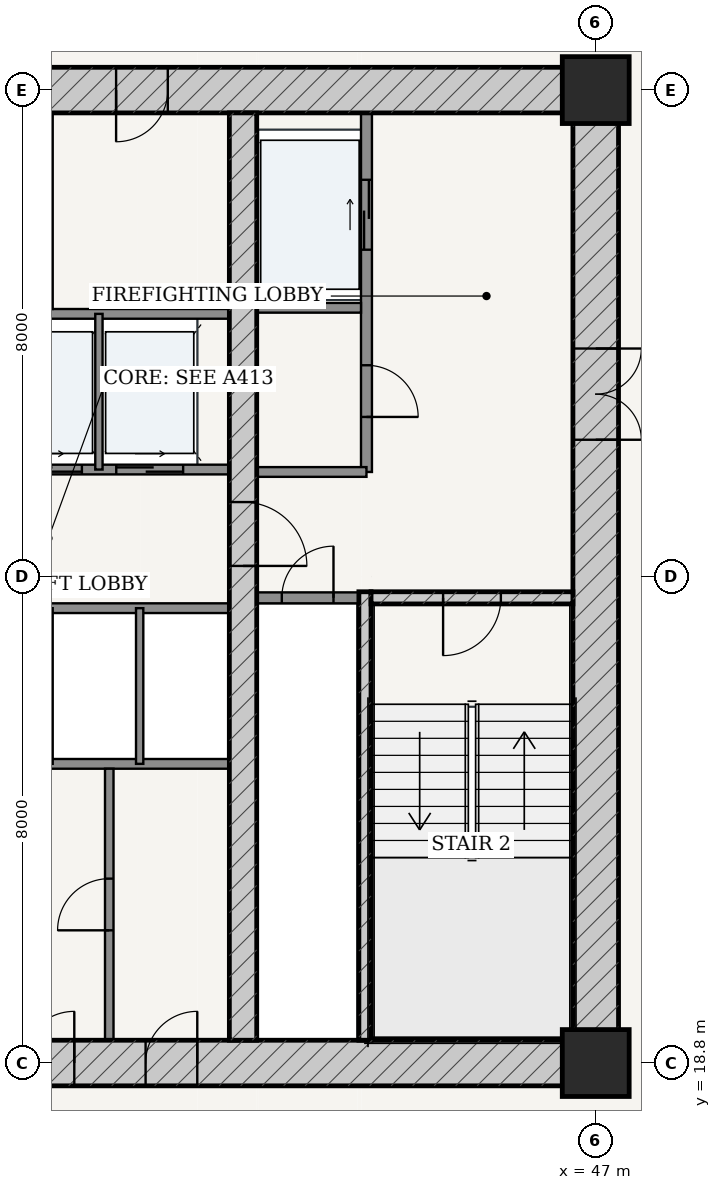
"""IFC4 building model, lengths in metres.
Left out: names, types, materials, properties, quantities, classifications, styles, units other than length and angle.
Written with IfcOpenShell. Run it as: python <this file> out.ifc"""

import sys

from ifc_helpers import new_model, si_unit, direction, frame, frame_2d, origin, origin_2d, place, context, subcontext, project, spatial, rectangle, extrude, source, transform, mapped, element, fill, save


model = new_model("IFC4")
c1 = context("Model", 3, precision=1e-05, world=origin(), true_north=direction((-0.2419218956, 0.970295726276)))
c2 = subcontext(c1, "Body", "Model", "MODEL_VIEW")
j1 = project(units=[si_unit("LENGTHUNIT", "METRE"), si_unit("PLANEANGLEUNIT", "RADIAN")], contexts=[c1])
p1 = place(None, origin())
s1 = spatial("IfcSite", under=j1, at=p1, CompositionType="ELEMENT")
p2 = place(p1, origin())
s2 = spatial("IfcBuilding", under=s1, at=p2, CompositionType="ELEMENT")
p3 = place(p2, frame((0.0, 0.0, 67.2)))
s3 = spatial("IfcBuildingStorey", under=s2, at=p3, CompositionType="ELEMENT", Elevation=67.2)
for number, where, z_axis, x_axis in (
    (1, (47.0, 18.8, 0.0), (0.0, 0.0, 1.0), (1.0, 0.0, 0.0)),
    (2, (47.0, 34.8, 0.0), (0.0, 0.0, 1.0), (1.0, 0.0, 0.0)),
):
    element("IfcColumn", number, at=place(p3, frame(where, z_axis=z_axis, x_axis=x_axis)), inside=s3, PredefinedType="COLUMN", context=c2, shape_type="SweptSolid", body=[
        extrude(rectangle(XDim=1.1, YDim=1.1, at=origin_2d()), origin(), (0.0, 0.0, 1.0), 3.6),
    ])
p4 = place(p3, frame((28.625, 18.8, 0.0), z_axis=(0.0, 0.0, 1.0), x_axis=(1.0, 0.0, 0.0)))
e3 = element("IfcWall", 3, at=p4, inside=s3, PredefinedType="SHEAR", context=c2, shape_type="SweptSolid", body=[
    extrude(rectangle(XDim=18.75, YDim=0.75, at=frame_2d((9.375, 0.0))), origin(), (0.0, 0.0, 1.0), 3.32),
])
p5 = place(p4, frame((6.927, 0.0, 0.0)))
e4 = element("IfcOpeningElement", 4, at=p5, cuts=e3, PredefinedType="OPENING", context=c2, shape_type="SweptSolid", body=[
    extrude(rectangle(XDim=0.85, YDim=2.1, at=frame_2d((0.425, 1.05))), frame((0.0, 0.385, 0.0), z_axis=(0.0, -1.0, 0.0), x_axis=(1.0, 0.0, 0.0)), (0.0, 0.0, 1.0), 0.77),
])
p6 = place(p4, frame((8.95, 0.0, 0.0)))
e5 = element("IfcOpeningElement", 5, at=p6, cuts=e3, PredefinedType="OPENING", context=c2, shape_type="SweptSolid", body=[
    extrude(rectangle(XDim=0.85, YDim=2.1, at=frame_2d((0.425, 1.05))), frame((0.0, 0.385, 0.0), z_axis=(0.0, -1.0, 0.0), x_axis=(1.0, 0.0, 0.0)), (0.0, 0.0, 1.0), 0.77),
])
p7 = place(p4, frame((10.972, 0.0, 0.0)))
e6 = element("IfcOpeningElement", 6, at=p7, cuts=e3, PredefinedType="OPENING", context=c2, shape_type="SweptSolid", body=[
    extrude(rectangle(XDim=0.85, YDim=2.1, at=frame_2d((0.425, 1.05))), frame((0.0, 0.385, 0.0), z_axis=(0.0, -1.0, 0.0), x_axis=(1.0, 0.0, 0.0)), (0.0, 0.0, 1.0), 0.77),
])
p8 = place(p3, frame((28.625, 34.8, 0.0), z_axis=(0.0, 0.0, 1.0), x_axis=(1.0, 0.0, 0.0)))
e7 = element("IfcWall", 7, at=p8, inside=s3, PredefinedType="SHEAR", context=c2, shape_type="SweptSolid", body=[
    extrude(rectangle(XDim=18.75, YDim=0.75, at=frame_2d((9.375, 0.0))), origin(), (0.0, 0.0, 1.0), 3.32),
])
p9 = place(p8, frame((7.407, 0.0, 0.0)))
e8 = element("IfcOpeningElement", 8, at=p9, cuts=e7, PredefinedType="OPENING", context=c2, shape_type="SweptSolid", body=[
    extrude(rectangle(XDim=0.86, YDim=2.1, at=frame_2d((0.43, 1.05))), frame((0.0, 0.385, 0.0), z_axis=(0.0, -1.0, 0.0), x_axis=(1.0, 0.0, 0.0)), (0.0, 0.0, 1.0), 0.77),
])
p10 = place(p8, frame((10.488, 0.0, 0.0)))
e9 = element("IfcOpeningElement", 9, at=p10, cuts=e7, PredefinedType="OPENING", context=c2, shape_type="SweptSolid", body=[
    extrude(rectangle(XDim=0.85, YDim=2.1, at=frame_2d((0.425, 1.05))), frame((0.0, 0.385, 0.0), z_axis=(0.0, -1.0, 0.0), x_axis=(1.0, 0.0, 0.0)), (0.0, 0.0, 1.0), 0.77),
])
p11 = place(p3, frame((47.0, 19.175, 0.0), z_axis=(0.0, 0.0, 1.0), x_axis=(0.0, 1.0, 0.0)))
e10 = element("IfcWall", 10, at=p11, inside=s3, PredefinedType="SHEAR", context=c2, shape_type="SweptSolid", body=[
    extrude(rectangle(XDim=15.25, YDim=0.75, at=frame_2d((7.625, 0.0))), origin(), (0.0, 0.0, 1.0), 3.32),
])
p12 = place(p11, frame((9.875, 0.0, 0.0)))
e11 = element("IfcOpeningElement", 11, at=p12, cuts=e10, PredefinedType="OPENING", context=c2, shape_type="SweptSolid", body=[
    extrude(rectangle(XDim=1.5, YDim=2.2, at=frame_2d((0.75, 1.1))), frame((0.0, 0.385, 0.0), z_axis=(0.0, -1.0, 0.0), x_axis=(1.0, 0.0, 0.0)), (0.0, 0.0, 1.0), 0.77),
])
p13 = place(p3, frame((43.205, 19.175, 0.0), z_axis=(0.0, 0.0, 1.0), x_axis=(0.0, 1.0, 0.0)))
e12 = element("IfcWall", 12, at=p13, inside=s3, PredefinedType="SOLIDWALL", context=c2, shape_type="SweptSolid", body=[
    extrude(rectangle(XDim=7.375, YDim=0.2, at=frame_2d((3.688, 0.0))), origin(), (0.0, 0.0, 1.0), 3.32),
])
p14 = place(p3, frame((43.305, 26.45, 0.0), z_axis=(0.0, 0.0, 1.0), x_axis=(1.0, 0.0, 0.0)))
e13 = element("IfcWall", 13, at=p14, inside=s3, PredefinedType="SOLIDWALL", context=c2, shape_type="SweptSolid", body=[
    extrude(rectangle(XDim=3.32, YDim=0.2, at=frame_2d((1.66, 0.0))), origin(), (0.0, 0.0, 1.0), 3.32),
])
p15 = place(p14, frame((1.185, 0.0, 0.0)))
e14 = element("IfcOpeningElement", 14, at=p15, cuts=e13, PredefinedType="OPENING", context=c2, shape_type="SweptSolid", body=[
    extrude(rectangle(XDim=0.95, YDim=2.15, at=frame_2d((0.475, 1.075))), frame((0.0, 0.11, 0.0), z_axis=(0.0, -1.0, 0.0), x_axis=(1.0, 0.0, 0.0)), (0.0, 0.0, 1.0), 0.22),
])
p16 = place(p3, frame((41.2, 19.175, 0.0), z_axis=(0.0, 0.0, 1.0), x_axis=(0.0, 1.0, 0.0)))
e15 = element("IfcWall", 15, at=p16, inside=s3, PredefinedType="SHEAR", context=c2, shape_type="SweptSolid", body=[
    extrude(rectangle(XDim=15.25, YDim=0.45, at=frame_2d((7.625, 0.0))), origin(), (0.0, 0.0, 1.0), 3.32),
])
p17 = place(p16, frame((7.8, 0.0, 0.0)))
e16 = element("IfcOpeningElement", 16, at=p17, cuts=e15, PredefinedType="OPENING", context=c2, shape_type="SweptSolid", body=[
    extrude(rectangle(XDim=1.05, YDim=2.15, at=frame_2d((0.525, 1.075))), frame((0.0, 0.235, 0.0), z_axis=(0.0, -1.0, 0.0), x_axis=(1.0, 0.0, 0.0)), (0.0, 0.0, 1.0), 0.47),
])
p18 = place(p3, frame((41.425, 26.45, 0.0), z_axis=(0.0, 0.0, 1.0), x_axis=(1.0, 0.0, 0.0)))
e17 = element("IfcWall", 17, at=p18, inside=s3, PredefinedType="PARTITIONING", context=c2, shape_type="SweptSolid", body=[
    extrude(rectangle(XDim=1.675, YDim=0.18, at=frame_2d((0.837, 0.0))), origin(), (0.0, 0.0, 1.0), 3.32),
])
p19 = place(p18, frame((0.413, 0.0, 0.0)))
e18 = element("IfcOpeningElement", 18, at=p19, cuts=e17, PredefinedType="OPENING", context=c2, shape_type="SweptSolid", body=[
    extrude(rectangle(XDim=0.85, YDim=2.1, at=frame_2d((0.425, 1.05))), frame((0.0, 0.1, 0.0), z_axis=(0.0, -1.0, 0.0), x_axis=(1.0, 0.0, 0.0)), (0.0, 0.0, 1.0), 0.2),
])
p20 = place(p3, frame((43.23, 28.52, 0.0), z_axis=(0.0, 0.0, 1.0), x_axis=(0.0, 1.0, 0.0)))
e19 = element("IfcWall", 19, at=p20, inside=s3, PredefinedType="PARTITIONING", context=c2, shape_type="SweptSolid", body=[
    extrude(rectangle(XDim=5.905, YDim=0.18, at=frame_2d((2.953, 0.0))), origin(), (0.0, 0.0, 1.0), 3.32),
])
p21 = place(p20, frame((0.905, 0.0, 0.0)))
e20 = element("IfcOpeningElement", 20, at=p21, cuts=e19, PredefinedType="OPENING", context=c2, shape_type="SweptSolid", body=[
    extrude(rectangle(XDim=0.85, YDim=2.1, at=frame_2d((0.425, 1.05))), frame((0.0, 0.1, 0.0), z_axis=(0.0, -1.0, 0.0), x_axis=(1.0, 0.0, 0.0)), (0.0, 0.0, 1.0), 0.2),
])
p22 = place(p20, frame((3.655, 0.0, 0.0)))
e21 = element("IfcOpeningElement", 21, at=p22, cuts=e19, PredefinedType="OPENING", context=c2, shape_type="SweptSolid", body=[
    extrude(rectangle(XDim=1.15, YDim=2.2, at=frame_2d((0.575, 1.1))), frame((0.0, 0.1, 0.0), z_axis=(0.0, -1.0, 0.0), x_axis=(1.0, 0.0, 0.0)), (0.0, 0.0, 1.0), 0.2),
])
p23 = place(p3, frame((41.425, 31.22, 0.0), z_axis=(0.0, 0.0, 1.0), x_axis=(1.0, 0.0, 0.0)))
e22 = element("IfcWall", 22, at=p23, inside=s3, PredefinedType="PARTITIONING", context=c2, shape_type="SweptSolid", body=[
    extrude(rectangle(XDim=1.715, YDim=0.16, at=frame_2d((0.857, 0.0))), origin(), (0.0, 0.0, 1.0), 3.32),
])
p24 = place(p3, frame((41.425, 28.52, 0.0), z_axis=(0.0, 0.0, 1.0), x_axis=(1.0, 0.0, 0.0)))
e23 = element("IfcWall", 23, at=p24, inside=s3, PredefinedType="PARTITIONING", context=c2, shape_type="SweptSolid", body=[
    extrude(rectangle(XDim=1.805, YDim=0.16, at=frame_2d((0.902, 0.0))), origin(), (0.0, 0.0, 1.0), 3.32),
])
p25 = place(p3, frame((35.025, 28.56, 0.0), z_axis=(0.0, 0.0, 1.0), x_axis=(1.0, 0.0, 0.0)))
e24 = element("IfcWall", 24, at=p25, inside=s3, PredefinedType="PARTITIONING", context=c2, shape_type="SweptSolid", body=[
    extrude(rectangle(XDim=5.95, YDim=0.16, at=frame_2d((2.975, 0.0))), origin(), (0.0, 0.0, 1.0), 3.32),
])
p26 = place(p25, frame((0.76, 0.0, 0.0)))
e25 = element("IfcOpeningElement", 25, at=p26, cuts=e24, PredefinedType="OPENING", context=c2, shape_type="SweptSolid", body=[
    extrude(rectangle(XDim=1.1, YDim=2.2, at=frame_2d((0.55, 1.1))), frame((0.0, 0.09, 0.0), z_axis=(0.0, -1.0, 0.0), x_axis=(1.0, 0.0, 0.0)), (0.0, 0.0, 1.0), 0.18),
])
p27 = place(p25, frame((2.425, 0.0, 0.0)))
e26 = element("IfcOpeningElement", 26, at=p27, cuts=e24, PredefinedType="OPENING", context=c2, shape_type="SweptSolid", body=[
    extrude(rectangle(XDim=1.1, YDim=2.2, at=frame_2d((0.55, 1.1))), frame((0.0, 0.09, 0.0), z_axis=(0.0, -1.0, 0.0), x_axis=(1.0, 0.0, 0.0)), (0.0, 0.0, 1.0), 0.18),
])
p28 = place(p25, frame((4.09, 0.0, 0.0)))
e27 = element("IfcOpeningElement", 27, at=p28, cuts=e24, PredefinedType="OPENING", context=c2, shape_type="SweptSolid", body=[
    extrude(rectangle(XDim=1.1, YDim=2.2, at=frame_2d((0.55, 1.1))), frame((0.0, 0.09, 0.0), z_axis=(0.0, -1.0, 0.0), x_axis=(1.0, 0.0, 0.0)), (0.0, 0.0, 1.0), 0.18),
])
p29 = place(p3, frame((35.025, 31.12, 0.0), z_axis=(0.0, 0.0, 1.0), x_axis=(1.0, 0.0, 0.0)))
e28 = element("IfcWall", 28, at=p29, inside=s3, PredefinedType="PARTITIONING", context=c2, shape_type="SweptSolid", body=[
    extrude(rectangle(XDim=5.95, YDim=0.16, at=frame_2d((2.975, 0.0))), origin(), (0.0, 0.0, 1.0), 3.32),
])
p30 = place(p3, frame((38.83, 28.56, 0.0), z_axis=(0.0, 0.0, 1.0), x_axis=(0.0, 1.0, 0.0)))
e29 = element("IfcWall", 29, at=p30, inside=s3, PredefinedType="PARTITIONING", context=c2, shape_type="SweptSolid", body=[
    extrude(rectangle(XDim=2.56, YDim=0.12, at=frame_2d((1.28, 0.0))), origin(), (0.0, 0.0, 1.0), 3.32),
])
for number, where, z_axis, x_axis in (
    (30, (35.025, 26.28, 0.0), (0.0, 0.0, 1.0), (1.0, 0.0, 0.0)),
    (31, (35.025, 23.72, 0.0), (0.0, 0.0, 1.0), (1.0, 0.0, 0.0)),
):
    element("IfcWall", number, at=place(p3, frame(where, z_axis=z_axis, x_axis=x_axis)), inside=s3, PredefinedType="PARTITIONING", context=c2, shape_type="SweptSolid", body=[
        extrude(rectangle(XDim=5.95, YDim=0.16, at=frame_2d((2.975, 0.0))), origin(), (0.0, 0.0, 1.0), 3.32),
    ])
p31 = place(p3, frame((39.5, 23.72, 0.0), z_axis=(0.0, 0.0, 1.0), x_axis=(0.0, 1.0, 0.0)))
e32 = element("IfcWall", 32, at=p31, inside=s3, PredefinedType="PARTITIONING", context=c2, shape_type="SweptSolid", body=[
    extrude(rectangle(XDim=2.56, YDim=0.12, at=frame_2d((1.28, 0.0))), origin(), (0.0, 0.0, 1.0), 3.32),
])
p32 = place(p3, frame((39.0, 19.175, 0.0), z_axis=(0.0, 0.0, 1.0), x_axis=(0.0, 1.0, 0.0)))
e33 = element("IfcWall", 33, at=p32, inside=s3, PredefinedType="PARTITIONING", context=c2, shape_type="SweptSolid", body=[
    extrude(rectangle(XDim=4.465, YDim=0.14, at=frame_2d((2.232, 0.0))), origin(), (0.0, 0.0, 1.0), 3.32),
])
p33 = place(p32, frame((1.808, 0.0, 0.0)))
e34 = element("IfcOpeningElement", 34, at=p33, cuts=e33, PredefinedType="OPENING", context=c2, shape_type="SweptSolid", body=[
    extrude(rectangle(XDim=0.85, YDim=2.1, at=frame_2d((0.425, 1.05))), frame((0.0, 0.08, 0.0), z_axis=(0.0, -1.0, 0.0), x_axis=(1.0, 0.0, 0.0)), (0.0, 0.0, 1.0), 0.16),
])
m1 = source(origin(), c2, "Body", "SweptSolid", [
    extrude(rectangle(XDim=1.5, YDim=2.2, at=frame_2d((0.75, 1.1))), frame((0.0, 0.025, 0.0), z_axis=(0.0, -1.0, 0.0), x_axis=(1.0, 0.0, 0.0)), (0.0, 0.0, 1.0), 0.05),
])
p34 = place(p12, frame((1.5, 0.0, 0.0), z_axis=(0.0, 0.0, 1.0), x_axis=(-1.0, 0.0, 0.0)))
e35 = element("IfcDoor", 35, at=p34, inside=s3, OperationType="DOUBLE_DOOR_SINGLE_SWING", PredefinedType="DOOR", context=c2, shape_type="MappedRepresentation", body=[
    mapped(m1, transform((0.0, 0.0, 0.0), scale=1.0)),
])
fill(e11, e35)
m2 = source(origin(), c2, "Body", "SweptSolid", [
    extrude(rectangle(XDim=1.05, YDim=2.15, at=frame_2d((0.525, 1.075))), frame((0.0, 0.025, 0.0), z_axis=(0.0, -1.0, 0.0), x_axis=(1.0, 0.0, 0.0)), (0.0, 0.0, 1.0), 0.05),
])
p35 = place(p17, frame((1.05, 0.0, 0.0), z_axis=(0.0, 0.0, 1.0), x_axis=(-1.0, 0.0, 0.0)))
e36 = element("IfcDoor", 36, at=p35, inside=s3, OperationType="SINGLE_SWING_RIGHT", PredefinedType="DOOR", context=c2, shape_type="MappedRepresentation", body=[
    mapped(m2, transform((0.0, 0.0, 0.0), scale=1.0)),
])
fill(e16, e36)
m3 = source(origin(), c2, "Body", "SweptSolid", [
    extrude(rectangle(XDim=0.95, YDim=2.15, at=frame_2d((0.475, 1.075))), frame((0.0, 0.025, 0.0), z_axis=(0.0, -1.0, 0.0), x_axis=(1.0, 0.0, 0.0)), (0.0, 0.0, 1.0), 0.05),
])
p36 = place(p15, frame((0.95, 0.0, 0.0), z_axis=(0.0, 0.0, 1.0), x_axis=(-1.0, 0.0, 0.0)))
e37 = element("IfcDoor", 37, at=p36, inside=s3, OperationType="SINGLE_SWING_RIGHT", PredefinedType="DOOR", context=c2, shape_type="MappedRepresentation", body=[
    mapped(m3, transform((0.0, 0.0, 0.0), scale=1.0)),
])
fill(e14, e37)
m4 = source(origin(), c2, "Body", "SweptSolid", [
    extrude(rectangle(XDim=0.85, YDim=2.1, at=frame_2d((0.425, 1.05))), frame((0.0, 0.025, 0.0), z_axis=(0.0, -1.0, 0.0), x_axis=(1.0, 0.0, 0.0)), (0.0, 0.0, 1.0), 0.05),
])
p37 = place(p19, origin())
e38 = element("IfcDoor", 38, at=p37, inside=s3, OperationType="SINGLE_SWING_RIGHT", PredefinedType="DOOR", context=c2, shape_type="MappedRepresentation", body=[
    mapped(m4, transform((0.0, 0.0, 0.0), scale=1.0)),
])
fill(e18, e38)
p38 = place(p21, frame((0.85, 0.0, 0.0), z_axis=(0.0, 0.0, 1.0), x_axis=(-1.0, 0.0, 0.0)))
e39 = element("IfcDoor", 39, at=p38, inside=s3, OperationType="SINGLE_SWING_RIGHT", PredefinedType="DOOR", context=c2, shape_type="MappedRepresentation", body=[
    mapped(m4, transform((0.0, 0.0, 0.0), scale=1.0)),
])
fill(e20, e39)
p39 = place(p10, frame((0.85, 0.0, 0.0), z_axis=(0.0, 0.0, 1.0), x_axis=(-1.0, 0.0, 0.0)))
e40 = element("IfcDoor", 40, at=p39, inside=s3, OperationType="SINGLE_SWING_RIGHT", PredefinedType="DOOR", context=c2, shape_type="MappedRepresentation", body=[
    mapped(m4, transform((0.0, 0.0, 0.0), scale=1.0)),
])
fill(e9, e40)
p40 = place(p6, origin())
e41 = element("IfcDoor", 41, at=p40, inside=s3, OperationType="SINGLE_SWING_RIGHT", PredefinedType="DOOR", context=c2, shape_type="MappedRepresentation", body=[
    mapped(m4, transform((0.0, 0.0, 0.0), scale=1.0)),
])
fill(e5, e41)
p41 = place(p7, origin())
e42 = element("IfcDoor", 42, at=p41, inside=s3, OperationType="SINGLE_SWING_RIGHT", PredefinedType="DOOR", context=c2, shape_type="MappedRepresentation", body=[
    mapped(m4, transform((0.0, 0.0, 0.0), scale=1.0)),
])
fill(e6, e42)
p42 = place(p33, origin())
e43 = element("IfcDoor", 43, at=p42, inside=s3, OperationType="SINGLE_SWING_LEFT", PredefinedType="DOOR", context=c2, shape_type="MappedRepresentation", body=[
    mapped(m4, transform((0.0, 0.0, 0.0), scale=1.0)),
])
fill(e34, e43)
m5 = source(origin(), c2, "Body", "SweptSolid", [
    extrude(rectangle(XDim=1.15, YDim=2.2, at=frame_2d((0.575, 1.1))), frame((0.0, 0.025, 0.0), z_axis=(0.0, -1.0, 0.0), x_axis=(1.0, 0.0, 0.0)), (0.0, 0.0, 1.0), 0.05),
])
p43 = place(p22, origin())
e44 = element("IfcDoor", 44, at=p43, inside=s3, OperationType="DOUBLE_DOOR_SLIDING", PredefinedType="DOOR", context=c2, shape_type="MappedRepresentation", body=[
    mapped(m5, transform((0.0, 0.0, 0.0), scale=1.0)),
])
fill(e21, e44)
m6 = source(origin(), c2, "Body", "SweptSolid", [
    extrude(rectangle(XDim=1.1, YDim=2.2, at=frame_2d((0.55, 1.1))), frame((0.0, 0.025, 0.0), z_axis=(0.0, -1.0, 0.0), x_axis=(1.0, 0.0, 0.0)), (0.0, 0.0, 1.0), 0.05),
])
p44 = place(p27, origin())
e45 = element("IfcDoor", 45, at=p44, inside=s3, OperationType="DOUBLE_DOOR_SLIDING", PredefinedType="DOOR", context=c2, shape_type="MappedRepresentation", body=[
    mapped(m6, transform((0.0, 0.0, 0.0), scale=1.0)),
])
fill(e26, e45)
p45 = place(p28, origin())
e46 = element("IfcDoor", 46, at=p45, inside=s3, OperationType="DOUBLE_DOOR_SLIDING", PredefinedType="DOOR", context=c2, shape_type="MappedRepresentation", body=[
    mapped(m6, transform((0.0, 0.0, 0.0), scale=1.0)),
])
fill(e27, e46)
save(model, sys.argv[1])
